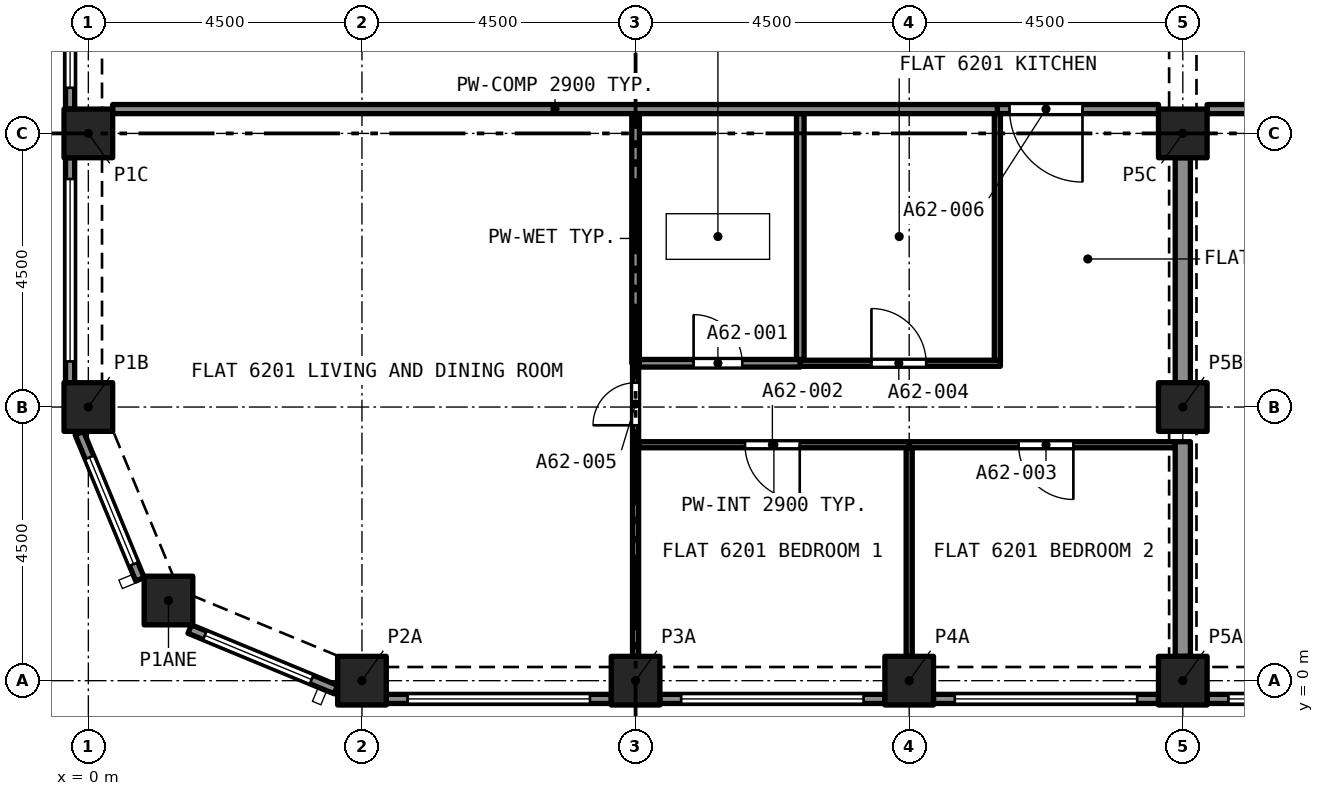
"""IFC4 building model, lengths in metres.
Left out: names, types, materials, properties, quantities, classifications, styles, units other than length and angle.
Written with IfcOpenShell. Run it as: python <this file> out.ifc"""

import sys

from ifc_helpers import new_model, si_unit, direction, frame, frame_2d, origin, origin_2d, place, context, subcontext, project, spatial, rectangle, extrude, element, fill, save


model = new_model("IFC4")
c1 = context("Model", 3, precision=1e-05, world=origin(), true_north=direction((0.0, 1.0)))
c2 = subcontext(c1, "Body", "Model", "MODEL_VIEW")
j1 = project(units=[si_unit("LENGTHUNIT", "METRE"), si_unit("PLANEANGLEUNIT", "RADIAN")], contexts=[c1])
p1 = place(None, origin())
s1 = spatial("IfcSite", under=j1, at=p1, CompositionType="ELEMENT")
p2 = place(p1, origin())
s2 = spatial("IfcBuilding", under=s1, at=p2, CompositionType="ELEMENT")
p3 = place(p2, frame((0.0, 0.0, 222.895)))
s3 = spatial("IfcBuildingStorey", under=s2, at=p3, CompositionType="ELEMENT", Elevation=222.895)
for number, where, z_axis, x_axis in (
    (1, (4.5, 0.0, 0.0), (0.0, 0.0, 1.0), (1.0, 0.0, 0.0)),
    (2, (9.0, 0.0, 0.0), (0.0, 0.0, 1.0), (1.0, 0.0, 0.0)),
    (3, (13.5, 0.0, 0.0), (0.0, 0.0, 1.0), (1.0, 0.0, 0.0)),
    (4, (18.0, 0.0, 0.0), (0.0, 0.0, 1.0), (1.0, 0.0, 0.0)),
    (5, (1.318, 1.318, 0.0), (0.0, 0.0, 1.0), (1.0, 0.0, 0.0)),
    (6, (0.0, 4.5, 0.0), (0.0, 0.0, 1.0), (1.0, 0.0, 0.0)),
    (7, (18.0, 4.5, 0.0), (0.0, 0.0, 1.0), (1.0, 0.0, 0.0)),
    (8, (0.0, 9.0, 0.0), (0.0, 0.0, 1.0), (1.0, 0.0, 0.0)),
    (9, (18.0, 9.0, 0.0), (0.0, 0.0, 1.0), (1.0, 0.0, 0.0)),
):
    element("IfcColumn", number, at=place(p3, frame(where, z_axis=z_axis, x_axis=x_axis)), inside=s3, PredefinedType="COLUMN", context=c2, shape_type="SweptSolid", body=[
        extrude(rectangle(XDim=0.8, YDim=0.8, at=origin_2d()), origin(), (0.0, 0.0, 1.0), 3.2),
    ])
p4 = place(p3, frame((-0.3, 9.4, 0.0), z_axis=(0.0, 0.0, 1.0), x_axis=(0.0, 1.0, 0.0)))
e10 = element("IfcWall", 10, at=p4, inside=s3, PredefinedType="SOLIDWALL", context=c2, shape_type="SweptSolid", body=[
    extrude(rectangle(XDim=3.7, YDim=0.15, at=frame_2d((1.85, 0.0))), origin(), (0.0, 0.0, 1.0), 3.2),
])
p5 = place(p4, frame((0.35, 0.0, 0.45)))
e11 = element("IfcOpeningElement", 11, at=p5, cuts=e10, PredefinedType="OPENING", context=c2, shape_type="SweptSolid", body=[
    extrude(rectangle(XDim=3.0, YDim=1.95, at=frame_2d((1.5, 0.975))), frame((0.0, 0.085, 0.0), z_axis=(0.0, -1.0, 0.0), x_axis=(1.0, 0.0, 0.0)), (0.0, 0.0, 1.0), 0.17),
])
p6 = place(p3, frame((-0.3, 4.9, 0.0), z_axis=(0.0, 0.0, 1.0), x_axis=(0.0, 1.0, 0.0)))
e12 = element("IfcWall", 12, at=p6, inside=s3, PredefinedType="SOLIDWALL", context=c2, shape_type="SweptSolid", body=[
    extrude(rectangle(XDim=3.7, YDim=0.15, at=frame_2d((1.85, 0.0))), origin(), (0.0, 0.0, 1.0), 3.2),
])
p7 = place(p6, frame((0.35, 0.0, 0.45)))
e13 = element("IfcOpeningElement", 13, at=p7, cuts=e12, PredefinedType="OPENING", context=c2, shape_type="SweptSolid", body=[
    extrude(rectangle(XDim=3.0, YDim=1.95, at=frame_2d((1.5, 0.975))), frame((0.0, 0.085, 0.0), z_axis=(0.0, -1.0, 0.0), x_axis=(1.0, 0.0, 0.0)), (0.0, 0.0, 1.0), 0.17),
])
p8 = place(p3, frame((0.849, 1.667, 0.0), z_axis=(0.0, 0.0, 1.0), x_axis=(-0.382669406082, 0.923885342263, 0.0)))
e14 = element("IfcWall", 14, at=p8, inside=s3, PredefinedType="SOLIDWALL", context=c2, shape_type="SweptSolid", body=[
    extrude(rectangle(XDim=2.602, YDim=0.15, at=frame_2d((1.301, 0.0))), origin(), (0.0, 0.0, 1.0), 3.2),
])
p9 = place(p8, frame((0.27, 0.0, 0.45)))
e15 = element("IfcOpeningElement", 15, at=p9, cuts=e14, PredefinedType="OPENING", context=c2, shape_type="SweptSolid", body=[
    extrude(rectangle(XDim=1.9, YDim=1.95, at=frame_2d((0.95, 0.975))), frame((0.0, 0.085, 0.0), z_axis=(0.0, -1.0, 0.0), x_axis=(1.0, 0.0, 0.0)), (0.0, 0.0, 1.0), 0.17),
])
p10 = place(p3, frame((4.071, -0.147, 0.0), z_axis=(0.0, 0.0, 1.0), x_axis=(-0.923885342263, 0.382669406082, 0.0)))
e16 = element("IfcWall", 16, at=p10, inside=s3, PredefinedType="SOLIDWALL", context=c2, shape_type="SweptSolid", body=[
    extrude(rectangle(XDim=2.602, YDim=0.15, at=frame_2d((1.301, 0.0))), origin(), (0.0, 0.0, 1.0), 3.2),
])
p11 = place(p10, frame((0.432, 0.0, 0.45)))
e17 = element("IfcOpeningElement", 17, at=p11, cuts=e16, PredefinedType="OPENING", context=c2, shape_type="SweptSolid", body=[
    extrude(rectangle(XDim=1.9, YDim=1.95, at=frame_2d((0.95, 0.975))), frame((0.0, 0.085, 0.0), z_axis=(0.0, -1.0, 0.0), x_axis=(1.0, 0.0, 0.0)), (0.0, 0.0, 1.0), 0.17),
])
p12 = place(p3, frame((8.6, -0.3, 0.0), z_axis=(0.0, 0.0, 1.0), x_axis=(-1.0, 0.0, 0.0)))
e18 = element("IfcWall", 18, at=p12, inside=s3, PredefinedType="SOLIDWALL", context=c2, shape_type="SweptSolid", body=[
    extrude(rectangle(XDim=3.7, YDim=0.15, at=frame_2d((1.85, 0.0))), origin(), (0.0, 0.0, 1.0), 3.2),
])
p13 = place(p12, frame((0.35, 0.0, 0.45)))
e19 = element("IfcOpeningElement", 19, at=p13, cuts=e18, PredefinedType="OPENING", context=c2, shape_type="SweptSolid", body=[
    extrude(rectangle(XDim=3.0, YDim=1.95, at=frame_2d((1.5, 0.975))), frame((0.0, 0.085, 0.0), z_axis=(0.0, -1.0, 0.0), x_axis=(1.0, 0.0, 0.0)), (0.0, 0.0, 1.0), 0.17),
])
p14 = place(p3, frame((13.1, -0.3, 0.0), z_axis=(0.0, 0.0, 1.0), x_axis=(-1.0, 0.0, 0.0)))
e20 = element("IfcWall", 20, at=p14, inside=s3, PredefinedType="SOLIDWALL", context=c2, shape_type="SweptSolid", body=[
    extrude(rectangle(XDim=3.7, YDim=0.15, at=frame_2d((1.85, 0.0))), origin(), (0.0, 0.0, 1.0), 3.2),
])
p15 = place(p14, frame((0.35, 0.0, 0.45)))
e21 = element("IfcOpeningElement", 21, at=p15, cuts=e20, PredefinedType="OPENING", context=c2, shape_type="SweptSolid", body=[
    extrude(rectangle(XDim=3.0, YDim=1.95, at=frame_2d((1.5, 0.975))), frame((0.0, 0.085, 0.0), z_axis=(0.0, -1.0, 0.0), x_axis=(1.0, 0.0, 0.0)), (0.0, 0.0, 1.0), 0.17),
])
p16 = place(p3, frame((17.6, -0.3, 0.0), z_axis=(0.0, 0.0, 1.0), x_axis=(-1.0, 0.0, 0.0)))
e22 = element("IfcWall", 22, at=p16, inside=s3, PredefinedType="SOLIDWALL", context=c2, shape_type="SweptSolid", body=[
    extrude(rectangle(XDim=3.7, YDim=0.15, at=frame_2d((1.85, 0.0))), origin(), (0.0, 0.0, 1.0), 3.2),
])
p17 = place(p16, frame((0.35, 0.0, 0.45)))
e23 = element("IfcOpeningElement", 23, at=p17, cuts=e22, PredefinedType="OPENING", context=c2, shape_type="SweptSolid", body=[
    extrude(rectangle(XDim=3.0, YDim=1.95, at=frame_2d((1.5, 0.975))), frame((0.0, 0.085, 0.0), z_axis=(0.0, -1.0, 0.0), x_axis=(1.0, 0.0, 0.0)), (0.0, 0.0, 1.0), 0.17),
])
p18 = place(p3, frame((22.1, -0.3, 0.0), z_axis=(0.0, 0.0, 1.0), x_axis=(-1.0, 0.0, 0.0)))
e24 = element("IfcWall", 24, at=p18, inside=s3, PredefinedType="SOLIDWALL", context=c2, shape_type="SweptSolid", body=[
    extrude(rectangle(XDim=3.7, YDim=0.15, at=frame_2d((1.85, 0.0))), origin(), (0.0, 0.0, 1.0), 3.2),
])
p19 = place(p18, frame((0.35, 0.0, 0.45)))
e25 = element("IfcOpeningElement", 25, at=p19, cuts=e24, PredefinedType="OPENING", context=c2, shape_type="SweptSolid", body=[
    extrude(rectangle(XDim=3.0, YDim=1.95, at=frame_2d((1.5, 0.975))), frame((0.0, 0.085, 0.0), z_axis=(0.0, -1.0, 0.0), x_axis=(1.0, 0.0, 0.0)), (0.0, 0.0, 1.0), 0.17),
])
p20 = place(p3, frame((9.062, 5.22, 0.0), z_axis=(0.0, 0.0, 1.0), x_axis=(1.0, 0.0, 0.0)))
e26 = element("IfcWall", 26, at=p20, inside=s3, PredefinedType="PARTITIONING", context=c2, shape_type="SweptSolid", body=[
    extrude(rectangle(XDim=2.646, YDim=0.125, at=frame_2d((1.323, 0.0))), origin(), (0.0, 0.0, 1.0), 2.9),
])
p21 = place(p20, frame((0.892, 0.0, 0.0)))
e27 = element("IfcOpeningElement", 27, at=p21, cuts=e26, PredefinedType="OPENING", context=c2, shape_type="SweptSolid", body=[
    extrude(rectangle(XDim=0.8, YDim=2.1, at=frame_2d((0.4, 1.05))), frame((0.0, 0.073, 0.0), z_axis=(0.0, -1.0, 0.0), x_axis=(1.0, 0.0, 0.0)), (0.0, 0.0, 1.0), 0.145),
])
p22 = place(p3, frame((11.709, 5.282, 0.0), z_axis=(0.0, 0.0, 1.0), x_axis=(0.0, 1.0, 0.0)))
e28 = element("IfcWall", 28, at=p22, inside=s3, PredefinedType="PARTITIONING", context=c2, shape_type="SweptSolid", body=[
    extrude(rectangle(XDim=4.042, YDim=0.125, at=frame_2d((2.021, 0.0))), origin(), (0.0, 0.0, 1.0), 2.9),
])
p23 = place(p3, frame((9.0, 5.22, 0.0), z_axis=(0.0, 0.0, 1.0), x_axis=(0.0, 1.0, 0.0)))
e29 = element("IfcWall", 29, at=p23, inside=s3, PredefinedType="PARTITIONING", context=c2, shape_type="SweptSolid", body=[
    extrude(rectangle(XDim=4.105, YDim=0.125, at=frame_2d((2.052, 0.0))), origin(), (0.0, 0.0, 1.0), 2.9),
])
p24 = place(p3, frame((13.5, 0.4, 0.0), z_axis=(0.0, 0.0, 1.0), x_axis=(0.0, 1.0, 0.0)))
e30 = element("IfcWall", 30, at=p24, inside=s3, PredefinedType="PARTITIONING", context=c2, shape_type="SweptSolid", body=[
    extrude(rectangle(XDim=3.43, YDim=0.1, at=frame_2d((1.715, 0.0))), origin(), (0.0, 0.0, 1.0), 2.9),
])
p25 = place(p3, frame((13.5, 3.88, 0.0), z_axis=(0.0, 0.0, 1.0), x_axis=(-1.0, 0.0, 0.0)))
e31 = element("IfcWall", 31, at=p25, inside=s3, PredefinedType="PARTITIONING", context=c2, shape_type="SweptSolid", body=[
    extrude(rectangle(XDim=4.45, YDim=0.1, at=frame_2d((2.225, 0.0))), origin(), (0.0, 0.0, 1.0), 2.9),
])
p26 = place(p25, frame((1.8, 0.0, 0.0)))
e32 = element("IfcOpeningElement", 32, at=p26, cuts=e31, PredefinedType="OPENING", context=c2, shape_type="SweptSolid", body=[
    extrude(rectangle(XDim=0.9, YDim=2.1, at=frame_2d((0.45, 1.05))), frame((0.0, 0.06, 0.0), z_axis=(0.0, -1.0, 0.0), x_axis=(1.0, 0.0, 0.0)), (0.0, 0.0, 1.0), 0.12),
])
p27 = place(p3, frame((9.0, 0.4, 0.0), z_axis=(0.0, 0.0, 1.0), x_axis=(0.0, 1.0, 0.0)))
e33 = element("IfcWall", 33, at=p27, inside=s3, PredefinedType="PARTITIONING", context=c2, shape_type="SweptSolid", body=[
    extrude(rectangle(XDim=3.48, YDim=0.1, at=frame_2d((1.74, 0.0))), origin(), (0.0, 0.0, 1.0), 2.9),
])
p28 = place(p3, frame((17.875, 3.88, 0.0), z_axis=(0.0, 0.0, 1.0), x_axis=(-1.0, 0.0, 0.0)))
e34 = element("IfcWall", 34, at=p28, inside=s3, PredefinedType="PARTITIONING", context=c2, shape_type="SweptSolid", body=[
    extrude(rectangle(XDim=4.375, YDim=0.1, at=frame_2d((2.188, 0.0))), origin(), (0.0, 0.0, 1.0), 2.9),
])
p29 = place(p28, frame((1.675, 0.0, 0.0)))
e35 = element("IfcOpeningElement", 35, at=p29, cuts=e34, PredefinedType="OPENING", context=c2, shape_type="SweptSolid", body=[
    extrude(rectangle(XDim=0.9, YDim=2.1, at=frame_2d((0.45, 1.05))), frame((0.0, 0.06, 0.0), z_axis=(0.0, -1.0, 0.0), x_axis=(1.0, 0.0, 0.0)), (0.0, 0.0, 1.0), 0.12),
])
p30 = place(p3, frame((18.0, 0.4, 0.0), z_axis=(0.0, 0.0, 1.0), x_axis=(0.0, 1.0, 0.0)))
e36 = element("IfcWall", 36, at=p30, inside=s3, PredefinedType="PARTITIONING", context=c2, shape_type="SweptSolid", body=[
    extrude(rectangle(XDim=3.53, YDim=0.25, at=frame_2d((1.765, 0.0))), origin(), (0.0, 0.0, 1.0), 2.38),
])
p31 = place(p3, frame((11.708, 5.22, 0.0), z_axis=(0.0, 0.0, 1.0), x_axis=(1.0, 0.0, 0.0)))
e37 = element("IfcWall", 37, at=p31, inside=s3, PredefinedType="PARTITIONING", context=c2, shape_type="SweptSolid", body=[
    extrude(rectangle(XDim=3.292, YDim=0.1, at=frame_2d((1.646, 0.0))), origin(), (0.0, 0.0, 1.0), 2.9),
])
p32 = place(p31, frame((1.171, 0.0, 0.0)))
e38 = element("IfcOpeningElement", 38, at=p32, cuts=e37, PredefinedType="OPENING", context=c2, shape_type="SweptSolid", body=[
    extrude(rectangle(XDim=0.9, YDim=2.1, at=frame_2d((0.45, 1.05))), frame((0.0, 0.06, 0.0), z_axis=(0.0, -1.0, 0.0), x_axis=(1.0, 0.0, 0.0)), (0.0, 0.0, 1.0), 0.12),
])
p33 = place(p3, frame((14.95, 5.27, 0.0), z_axis=(0.0, 0.0, 1.0), x_axis=(0.0, 1.0, 0.0)))
e39 = element("IfcWall", 39, at=p33, inside=s3, PredefinedType="PARTITIONING", context=c2, shape_type="SweptSolid", body=[
    extrude(rectangle(XDim=4.055, YDim=0.1, at=frame_2d((2.027, 0.0))), origin(), (0.0, 0.0, 1.0), 2.9),
])
p34 = place(p3, frame((9.0, 3.88, 0.0), z_axis=(0.0, 0.0, 1.0), x_axis=(0.0, 1.0, 0.0)))
e40 = element("IfcWall", 40, at=p34, inside=s3, PredefinedType="PARTITIONING", context=c2, shape_type="SweptSolid", body=[
    extrude(rectangle(XDim=1.34, YDim=0.1, at=frame_2d((0.67, 0.0))), origin(), (0.0, 0.0, 1.0), 2.9),
])
p35 = place(p34, frame((0.32, 0.0, 0.0)))
e41 = element("IfcOpeningElement", 41, at=p35, cuts=e40, PredefinedType="OPENING", context=c2, shape_type="SweptSolid", body=[
    extrude(rectangle(XDim=0.7, YDim=2.1, at=frame_2d((0.35, 1.05))), frame((0.0, 0.06, 0.0), z_axis=(0.0, -1.0, 0.0), x_axis=(1.0, 0.0, 0.0)), (0.0, 0.0, 1.0), 0.12),
])
p36 = place(p3, frame((18.0, 4.9, 0.0), z_axis=(0.0, 0.0, 1.0), x_axis=(0.0, 1.0, 0.0)))
e42 = element("IfcWall", 42, at=p36, inside=s3, PredefinedType="PARTITIONING", context=c2, shape_type="SweptSolid", body=[
    extrude(rectangle(XDim=3.7, YDim=0.25, at=frame_2d((1.85, 0.0))), origin(), (0.0, 0.0, 1.0), 2.38),
])
p37 = place(p3, frame((17.6, 9.4, 0.0), z_axis=(0.0, 0.0, 1.0), x_axis=(-1.0, 0.0, 0.0)))
e43 = element("IfcWall", 43, at=p37, inside=s3, PredefinedType="PARTITIONING", context=c2, shape_type="SweptSolid", body=[
    extrude(rectangle(XDim=2.65, YDim=0.15, at=frame_2d((1.325, 0.0))), origin(), (0.0, 0.0, 1.0), 2.9),
])
p38 = place(p37, frame((1.25, 0.0, 0.0)))
e44 = element("IfcOpeningElement", 44, at=p38, cuts=e43, PredefinedType="OPENING", context=c2, shape_type="SweptSolid", body=[
    extrude(rectangle(XDim=1.2, YDim=2.4, at=frame_2d((0.6, 1.2))), frame((0.0, 0.085, 0.0), z_axis=(0.0, -1.0, 0.0), x_axis=(1.0, 0.0, 0.0)), (0.0, 0.0, 1.0), 0.17),
])
p39 = place(p3, frame((0.4, 9.4, 0.0), z_axis=(0.0, 0.0, 1.0), x_axis=(1.0, 0.0, 0.0)))
e45 = element("IfcWall", 45, at=p39, inside=s3, PredefinedType="PARTITIONING", context=c2, shape_type="SweptSolid", body=[
    extrude(rectangle(XDim=14.55, YDim=0.15, at=frame_2d((7.275, 0.0))), origin(), (0.0, 0.0, 1.0), 2.9),
])
p40 = place(p3, frame((31.1, 9.4, 0.0), z_axis=(0.0, 0.0, 1.0), x_axis=(-1.0, 0.0, 0.0)))
e46 = element("IfcWall", 46, at=p40, inside=s3, PredefinedType="PARTITIONING", context=c2, shape_type="SweptSolid", body=[
    extrude(rectangle(XDim=12.7, YDim=0.15, at=frame_2d((6.35, 0.0))), origin(), (0.0, 0.0, 1.0), 2.75),
])
p41 = place(p40, frame((6.05, 0.0, 0.0)))
e47 = element("IfcOpeningElement", 47, at=p41, cuts=e46, PredefinedType="OPENING", context=c2, shape_type="SweptSolid", body=[
    extrude(rectangle(XDim=1.0, YDim=2.1, at=frame_2d((0.5, 1.05))), frame((0.0, 0.085, 0.0), z_axis=(0.0, -1.0, 0.0), x_axis=(1.0, 0.0, 0.0)), (0.0, 0.0, 1.0), 0.17),
])
p42 = place(p5, origin())
e48 = element("IfcWindow", 48, at=p42, inside=s3, PartitioningType="SINGLE_PANEL", PredefinedType="WINDOW", context=c2, shape_type="SweptSolid", body=[
    extrude(rectangle(XDim=3.0, YDim=1.95, at=frame_2d((1.5, 0.975))), frame((0.0, 0.03, 0.0), z_axis=(0.0, -1.0, 0.0), x_axis=(1.0, 0.0, 0.0)), (0.0, 0.0, 1.0), 0.06),
])
fill(e11, e48)
p43 = place(p7, origin())
e49 = element("IfcWindow", 49, at=p43, inside=s3, PartitioningType="SINGLE_PANEL", PredefinedType="WINDOW", context=c2, shape_type="SweptSolid", body=[
    extrude(rectangle(XDim=3.0, YDim=1.95, at=frame_2d((1.5, 0.975))), frame((0.0, 0.03, 0.0), z_axis=(0.0, -1.0, 0.0), x_axis=(1.0, 0.0, 0.0)), (0.0, 0.0, 1.0), 0.06),
])
fill(e13, e49)
p44 = place(p9, origin())
e50 = element("IfcWindow", 50, at=p44, inside=s3, PartitioningType="SINGLE_PANEL", PredefinedType="WINDOW", context=c2, shape_type="SweptSolid", body=[
    extrude(rectangle(XDim=1.9, YDim=1.95, at=frame_2d((0.95, 0.975))), frame((0.0, 0.03, 0.0), z_axis=(0.0, -1.0, 0.0), x_axis=(1.0, 0.0, 0.0)), (0.0, 0.0, 1.0), 0.06),
])
fill(e15, e50)
p45 = place(p11, origin())
e51 = element("IfcWindow", 51, at=p45, inside=s3, PartitioningType="SINGLE_PANEL", PredefinedType="WINDOW", context=c2, shape_type="SweptSolid", body=[
    extrude(rectangle(XDim=1.9, YDim=1.95, at=frame_2d((0.95, 0.975))), frame((0.0, 0.03, 0.0), z_axis=(0.0, -1.0, 0.0), x_axis=(1.0, 0.0, 0.0)), (0.0, 0.0, 1.0), 0.06),
])
fill(e17, e51)
p46 = place(p13, origin())
e52 = element("IfcWindow", 52, at=p46, inside=s3, PartitioningType="SINGLE_PANEL", PredefinedType="WINDOW", context=c2, shape_type="SweptSolid", body=[
    extrude(rectangle(XDim=3.0, YDim=1.95, at=frame_2d((1.5, 0.975))), frame((0.0, 0.03, 0.0), z_axis=(0.0, -1.0, 0.0), x_axis=(1.0, 0.0, 0.0)), (0.0, 0.0, 1.0), 0.06),
])
fill(e19, e52)
p47 = place(p15, origin())
e53 = element("IfcWindow", 53, at=p47, inside=s3, PartitioningType="SINGLE_PANEL", PredefinedType="WINDOW", context=c2, shape_type="SweptSolid", body=[
    extrude(rectangle(XDim=3.0, YDim=1.95, at=frame_2d((1.5, 0.975))), frame((0.0, 0.03, 0.0), z_axis=(0.0, -1.0, 0.0), x_axis=(1.0, 0.0, 0.0)), (0.0, 0.0, 1.0), 0.06),
])
fill(e21, e53)
p48 = place(p17, origin())
e54 = element("IfcWindow", 54, at=p48, inside=s3, PartitioningType="SINGLE_PANEL", PredefinedType="WINDOW", context=c2, shape_type="SweptSolid", body=[
    extrude(rectangle(XDim=3.0, YDim=1.95, at=frame_2d((1.5, 0.975))), frame((0.0, 0.03, 0.0), z_axis=(0.0, -1.0, 0.0), x_axis=(1.0, 0.0, 0.0)), (0.0, 0.0, 1.0), 0.06),
])
fill(e23, e54)
p49 = place(p19, origin())
e55 = element("IfcWindow", 55, at=p49, inside=s3, PartitioningType="SINGLE_PANEL", PredefinedType="WINDOW", context=c2, shape_type="SweptSolid", body=[
    extrude(rectangle(XDim=3.0, YDim=1.95, at=frame_2d((1.5, 0.975))), frame((0.0, 0.03, 0.0), z_axis=(0.0, -1.0, 0.0), x_axis=(1.0, 0.0, 0.0)), (0.0, 0.0, 1.0), 0.06),
])
fill(e25, e55)
p50 = place(p21, origin())
e56 = element("IfcDoor", 56, at=p50, inside=s3, OperationType="SINGLE_SWING_LEFT", PredefinedType="DOOR", context=c2, shape_type="SweptSolid", body=[
    extrude(rectangle(XDim=0.8, YDim=2.1, at=frame_2d((0.4, 1.05))), frame((0.0, 0.025, 0.0), z_axis=(0.0, -1.0, 0.0), x_axis=(1.0, 0.0, 0.0)), (0.0, 0.0, 1.0), 0.05),
])
fill(e27, e56)
p51 = place(p26, origin())
e57 = element("IfcDoor", 57, at=p51, inside=s3, OperationType="SINGLE_SWING_RIGHT", PredefinedType="DOOR", context=c2, shape_type="SweptSolid", body=[
    extrude(rectangle(XDim=0.9, YDim=2.1, at=frame_2d((0.45, 1.05))), frame((0.0, 0.025, 0.0), z_axis=(0.0, -1.0, 0.0), x_axis=(1.0, 0.0, 0.0)), (0.0, 0.0, 1.0), 0.05),
])
fill(e32, e57)
p52 = place(p29, origin())
e58 = element("IfcDoor", 58, at=p52, inside=s3, OperationType="SINGLE_SWING_LEFT", PredefinedType="DOOR", context=c2, shape_type="SweptSolid", body=[
    extrude(rectangle(XDim=0.9, YDim=2.1, at=frame_2d((0.45, 1.05))), frame((0.0, 0.025, 0.0), z_axis=(0.0, -1.0, 0.0), x_axis=(1.0, 0.0, 0.0)), (0.0, 0.0, 1.0), 0.05),
])
fill(e35, e58)
p53 = place(p32, origin())
e59 = element("IfcDoor", 59, at=p53, inside=s3, OperationType="SINGLE_SWING_LEFT", PredefinedType="DOOR", context=c2, shape_type="SweptSolid", body=[
    extrude(rectangle(XDim=0.9, YDim=2.1, at=frame_2d((0.45, 1.05))), frame((0.0, 0.025, 0.0), z_axis=(0.0, -1.0, 0.0), x_axis=(1.0, 0.0, 0.0)), (0.0, 0.0, 1.0), 0.05),
])
fill(e38, e59)
p54 = place(p35, origin())
e60 = element("IfcDoor", 60, at=p54, inside=s3, OperationType="SINGLE_SWING_RIGHT", PredefinedType="DOOR", context=c2, shape_type="SweptSolid", body=[
    extrude(rectangle(XDim=0.7, YDim=2.1, at=frame_2d((0.35, 1.05))), frame((0.0, 0.025, 0.0), z_axis=(0.0, -1.0, 0.0), x_axis=(1.0, 0.0, 0.0)), (0.0, 0.0, 1.0), 0.05),
])
fill(e41, e60)
p55 = place(p38, origin())
e61 = element("IfcDoor", 61, at=p55, inside=s3, OperationType="SINGLE_SWING_RIGHT", PredefinedType="DOOR", context=c2, shape_type="SweptSolid", body=[
    extrude(rectangle(XDim=1.2, YDim=2.4, at=frame_2d((0.6, 1.2))), frame((0.0, 0.025, 0.0), z_axis=(0.0, -1.0, 0.0), x_axis=(1.0, 0.0, 0.0)), (0.0, 0.0, 1.0), 0.05),
])
fill(e44, e61)
save(model, sys.argv[1])
